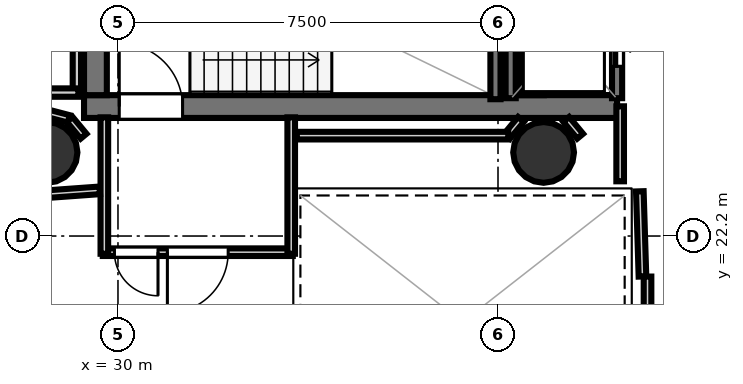
"""IFC4 building model, lengths in metres.
Left out: names, types, materials, properties, quantities, classifications, styles, units other than length and angle.
Written with IfcOpenShell. Run it as: python <this file> out.ifc"""

import sys

from ifc_helpers import new_model, si_unit, direction, frame, frame_2d, origin, origin_2d, place, context, subcontext, project, spatial, rectangle, hollow_circle, extrude, element, fill, save


model = new_model("IFC4")
c1 = context("Model", 3, precision=1e-05, world=origin(), true_north=direction((0.0, 1.0)))
c2 = subcontext(c1, "Body", "Model", "MODEL_VIEW")
j1 = project(units=[si_unit("LENGTHUNIT", "METRE"), si_unit("PLANEANGLEUNIT", "RADIAN")], contexts=[c1])
p1 = place(None, origin())
s1 = spatial("IfcSite", under=j1, at=p1, CompositionType="ELEMENT")
p2 = place(p1, origin())
s2 = spatial("IfcBuilding", under=s1, at=p2, CompositionType="ELEMENT")
p3 = place(p2, frame((0.0, 0.0, 207.7)))
s3 = spatial("IfcBuildingStorey", under=s2, at=p3, CompositionType="ELEMENT", Elevation=207.7)
p4 = place(p3, frame((29.33, 24.755, 0.0), z_axis=(0.0, 0.0, 1.0), x_axis=(1.0, 0.0, 0.0)))
e1 = element("IfcWall", 1, at=p4, inside=s3, PredefinedType="SHEAR", context=c2, shape_type="SweptSolid", body=[
    extrude(rectangle(XDim=10.52, YDim=0.45, at=frame_2d((5.26, 0.0))), origin(), (0.0, 0.0, 1.0), 3.52),
])
p5 = place(p4, frame((0.695, 0.0, 0.0)))
e2 = element("IfcOpeningElement", 2, at=p5, cuts=e1, PredefinedType="OPENING", context=c2, shape_type="SweptSolid", body=[
    extrude(rectangle(XDim=1.25, YDim=2.15, at=frame_2d((0.625, 1.075))), frame((0.0, 0.235, 0.0), z_axis=(0.0, -1.0, 0.0), x_axis=(1.0, 0.0, 0.0)), (0.0, 0.0, 1.0), 0.47),
])
for number, where, z_axis, x_axis in (
    (3, (29.555, 24.98, 0.0), (0.0, 0.0, 1.0), (0.0, 1.0, 0.0)),
    (4, (38.18, 24.98, 0.0), (0.0, 0.0, 1.0), (0.0, 1.0, 0.0)),
):
    element("IfcWall", number, at=place(p3, frame(where, z_axis=z_axis, x_axis=x_axis)), inside=s3, PredefinedType="SHEAR", context=c2, shape_type="SweptSolid", body=[
        extrude(rectangle(XDim=7.44, YDim=0.45, at=frame_2d((3.72, 0.0))), origin(), (0.0, 0.0, 1.0), 3.52),
    ])
for number, where, z_axis, x_axis in (
    (5, (28.6, 23.85, 0.0), (0.0, 0.0, 1.0), (1.0, 0.0, 0.0)),
    (6, (38.4, 23.85, 0.0), (0.0, 0.0, 1.0), (1.0, 0.0, 0.0)),
):
    element("IfcColumn", number, at=place(p3, frame(where, z_axis=z_axis, x_axis=x_axis)), inside=s3, PredefinedType="COLUMN", context=c2, shape_type="SweptSolid", body=[
        extrude(hollow_circle(Radius=0.6, WallThickness=0.03, at=origin_2d()), origin(), (0.0, 0.0, 1.0), 3.7),
    ])
p6 = place(p3, frame((37.45, 24.9, 0.0), z_axis=(0.0, 0.0, 1.0), x_axis=(0.0, 1.0, 0.0)))
e7 = element("IfcWall", 7, at=p6, inside=s3, PredefinedType="SOLIDWALL", context=c2, shape_type="SweptSolid", body=[
    extrude(rectangle(XDim=3.06, YDim=0.2, at=frame_2d((1.53, 0.0))), origin(), (0.0, 0.0, 1.0), 3.52),
])
p7 = place(p3, frame((39.85, 24.92, 0.0), z_axis=(0.0, 0.0, 1.0), x_axis=(0.0, 1.0, 0.0)))
e8 = element("IfcWall", 8, at=p7, inside=s3, PredefinedType="SOLIDWALL", context=c2, shape_type="SweptSolid", body=[
    extrude(rectangle(XDim=2.36, YDim=0.2, at=frame_2d((1.18, 0.0))), origin(), (0.0, 0.0, 1.0), 3.52),
])
p8 = place(p7, frame((0.63, 0.0, 0.0)))
e9 = element("IfcOpeningElement", 9, at=p8, cuts=e8, PredefinedType="OPENING", context=c2, shape_type="SweptSolid", body=[
    extrude(rectangle(XDim=1.1, YDim=2.15, at=frame_2d((0.55, 1.075))), frame((0.0, 0.11, 0.0), z_axis=(0.0, -1.0, 0.0), x_axis=(1.0, 0.0, 0.0)), (0.0, 0.0, 1.0), 0.22),
])
p9 = place(p3, frame((37.75, 24.92, 0.0), z_axis=(0.0, 0.0, 1.0), x_axis=(0.0, 1.0, 0.0)))
e10 = element("IfcWall", 10, at=p9, inside=s3, PredefinedType="SOLIDWALL", context=c2, shape_type="SweptSolid", body=[
    extrude(rectangle(XDim=2.36, YDim=0.2, at=frame_2d((1.18, 0.0))), origin(), (0.0, 0.0, 1.0), 3.52),
])
p10 = place(p3, frame((33.45, 21.881, 0.0), z_axis=(0.0, 0.0, 1.0), x_axis=(-1.0, 0.0, 0.0)))
e11 = element("IfcWall", 11, at=p10, inside=s3, PredefinedType="PARTITIONING", context=c2, shape_type="SweptSolid", body=[
    extrude(rectangle(XDim=3.75, YDim=0.15, at=frame_2d((1.875, 0.0))), origin(), (0.0, 0.0, 1.0), 2.84),
])
p11 = place(p10, frame((1.275, 0.0, 0.0)))
e12 = element("IfcOpeningElement", 12, at=p11, cuts=e11, PredefinedType="OPENING", context=c2, shape_type="SweptSolid", body=[
    extrude(rectangle(XDim=1.2, YDim=2.15, at=frame_2d((0.6, 1.075))), frame((0.0, 0.085, 0.0), z_axis=(0.0, -1.0, 0.0), x_axis=(1.0, 0.0, 0.0)), (0.0, 0.0, 1.0), 0.17),
])
p12 = place(p10, frame((2.66, 0.0, 0.0)))
e13 = element("IfcOpeningElement", 13, at=p12, cuts=e11, PredefinedType="OPENING", context=c2, shape_type="SweptSolid", body=[
    extrude(rectangle(XDim=0.86, YDim=2.05, at=frame_2d((0.43, 1.025))), frame((0.0, 0.085, 0.0), z_axis=(0.0, -1.0, 0.0), x_axis=(1.0, 0.0, 0.0)), (0.0, 0.0, 1.0), 0.17),
])
for number, where, z_axis, x_axis in (
    (14, (29.731, 21.85, 0.0), (0.0, 0.0, 1.0), (0.0, 1.0, 0.0)),
    (15, (33.419, 24.542, 0.0), (0.0, 0.0, 1.0), (0.0, -1.0, 0.0)),
):
    element("IfcWall", number, at=place(p3, frame(where, z_axis=z_axis, x_axis=x_axis)), inside=s3, PredefinedType="PARTITIONING", context=c2, shape_type="SweptSolid", body=[
        extrude(rectangle(XDim=2.692, YDim=0.15, at=frame_2d((1.346, 0.0))), origin(), (0.0, 0.0, 1.0), 2.84),
    ])
p13 = place(p3, frame((40.351, 21.401, 0.0), z_axis=(0.0, 0.0, 1.0), x_axis=(-0.031058045979, 0.999517582527, 0.0)))
e16 = element("IfcWall", 16, at=p13, inside=s3, PredefinedType="PARTITIONING", context=c2, shape_type="SweptSolid", body=[
    extrude(rectangle(XDim=1.682, YDim=0.15, at=frame_2d((0.841, 0.0))), origin(), (0.0, 0.0, 1.0), 2.84),
])
p14 = place(p3, frame((39.911, 23.28, 0.0), z_axis=(0.0, 0.0, 1.0), x_axis=(0.0, 1.0, 0.0)))
e17 = element("IfcWall", 17, at=p14, inside=s3, PredefinedType="PARTITIONING", context=c2, shape_type="SweptSolid", body=[
    extrude(rectangle(XDim=1.48, YDim=0.15, at=frame_2d((0.74, 0.0))), origin(), (0.0, 0.0, 1.0), 2.84),
])
p15 = place(p3, frame((40.451, 18.08, 0.0), z_axis=(0.0, 0.0, 1.0), x_axis=(0.0, 1.0, 0.0)))
e18 = element("IfcWall", 18, at=p15, inside=s3, PredefinedType="PARTITIONING", context=c2, shape_type="SweptSolid", body=[
    extrude(rectangle(XDim=3.32, YDim=0.15, at=frame_2d((1.66, 0.0))), origin(), (0.0, 0.0, 1.0), 2.84),
])
p16 = place(p3, frame((29.189, 29.12, 0.0), z_axis=(0.0, 0.0, 1.0), x_axis=(0.0, -1.0, 0.0)))
e19 = element("IfcWall", 19, at=p16, inside=s3, PredefinedType="PLUMBINGWALL", context=c2, shape_type="SweptSolid", body=[
    extrude(rectangle(XDim=4.12, YDim=0.165, at=frame_2d((2.06, 0.0))), origin(), (0.0, 0.0, 1.0), 2.84),
])
p17 = place(p3, frame((29.22, 25.031, 0.0), z_axis=(0.0, 0.0, 1.0), x_axis=(-1.0, 0.0, 0.0)))
e20 = element("IfcWall", 20, at=p17, inside=s3, PredefinedType="PLUMBINGWALL", context=c2, shape_type="SweptSolid", body=[
    extrude(rectangle(XDim=1.5, YDim=0.165, at=frame_2d((0.75, 0.0))), origin(), (0.0, 0.0, 1.0), 2.84),
])
p18 = place(p3, frame((29.321, 24.17, 0.0), z_axis=(0.0, 0.0, 1.0), x_axis=(-0.638008265708, 0.770029514296, 0.0)))
e21 = element("IfcWall", 21, at=p18, inside=s3, PredefinedType="PARTITIONING", context=c2, shape_type="SweptSolid", body=[
    extrude(rectangle(XDim=0.431, YDim=0.15, at=frame_2d((0.215, 0.0))), origin(), (0.0, 0.0, 1.0), 2.84),
])
p19 = place(p3, frame((29.03, 24.512, 0.0), z_axis=(0.0, 0.0, 1.0), x_axis=(-0.967681003213, 0.252177469296, 0.0)))
e22 = element("IfcWall", 22, at=p19, inside=s3, PredefinedType="PARTITIONING", context=c2, shape_type="SweptSolid", body=[
    extrude(rectangle(XDim=0.488, YDim=0.15, at=frame_2d((0.244, 0.0))), origin(), (0.0, 0.0, 1.0), 2.84),
])
for number, where, z_axis, x_axis in (
    (23, (39.121, 24.17, 0.0), (0.0, 0.0, 1.0), (-0.638, 0.77, 0.0)),
    (24, (37.954, 24.502, 0.0), (0.0, 0.0, 1.0), (-0.638, -0.77, 0.0)),
):
    element("IfcWall", number, at=place(p3, frame(where, z_axis=z_axis, x_axis=x_axis)), inside=s3, PredefinedType="PARTITIONING", context=c2, shape_type="SweptSolid", body=[
        extrude(rectangle(XDim=0.431, YDim=0.15, at=frame_2d((0.215, 0.0))), origin(), (0.0, 0.0, 1.0), 2.84),
    ])
p20 = place(p3, frame((37.703, 24.181, 0.0), z_axis=(0.0, 0.0, 1.0), x_axis=(-1.0, 0.0, 0.0)))
e25 = element("IfcWall", 25, at=p20, inside=s3, PredefinedType="PARTITIONING", context=c2, shape_type="SweptSolid", body=[
    extrude(rectangle(XDim=4.173, YDim=0.15, at=frame_2d((2.086, 0.0))), origin(), (0.0, 0.0, 1.0), 2.84),
])
p21 = place(p3, frame((28.442, 23.015, 0.0), z_axis=(0.0, 0.0, 1.0), x_axis=(0.99740683837, 0.07196942943, 0.0)))
e26 = element("IfcWall", 26, at=p21, inside=s3, PredefinedType="PARTITIONING", context=c2, shape_type="SweptSolid", body=[
    extrude(rectangle(XDim=1.201, YDim=0.15, at=frame_2d((0.601, 0.0))), origin(), (0.0, 0.0, 1.0), 2.84),
])
p22 = place(p5, origin())
e27 = element("IfcDoor", 27, at=p22, inside=s3, OperationType="SINGLE_SWING_LEFT", PredefinedType="DOOR", context=c2, shape_type="SweptSolid", body=[
    extrude(rectangle(XDim=1.25, YDim=2.15, at=frame_2d((0.625, 1.075))), frame((0.0, 0.025, 0.0), z_axis=(0.0, -1.0, 0.0), x_axis=(1.0, 0.0, 0.0)), (0.0, 0.0, 1.0), 0.05),
])
fill(e2, e27)
p23 = place(p8, origin())
e28 = element("IfcDoor", 28, at=p23, inside=s3, OperationType="SLIDING_TO_LEFT", PredefinedType="DOOR", context=c2, shape_type="SweptSolid", body=[
    extrude(rectangle(XDim=1.1, YDim=2.15, at=frame_2d((0.55, 1.075))), frame((0.0, 0.025, 0.0), z_axis=(0.0, -1.0, 0.0), x_axis=(1.0, 0.0, 0.0)), (0.0, 0.0, 1.0), 0.05),
])
fill(e9, e28)
p24 = place(p11, origin())
e29 = element("IfcDoor", 29, at=p24, inside=s3, OperationType="SINGLE_SWING_RIGHT", PredefinedType="DOOR", context=c2, shape_type="SweptSolid", body=[
    extrude(rectangle(XDim=1.2, YDim=2.15, at=frame_2d((0.6, 1.075))), frame((0.0, 0.025, 0.0), z_axis=(0.0, -1.0, 0.0), x_axis=(1.0, 0.0, 0.0)), (0.0, 0.0, 1.0), 0.05),
])
fill(e12, e29)
p25 = place(p12, origin())
e30 = element("IfcDoor", 30, at=p25, inside=s3, OperationType="SINGLE_SWING_LEFT", PredefinedType="DOOR", context=c2, shape_type="SweptSolid", body=[
    extrude(rectangle(XDim=0.86, YDim=2.05, at=frame_2d((0.43, 1.025))), frame((0.0, 0.025, 0.0), z_axis=(0.0, -1.0, 0.0), x_axis=(1.0, 0.0, 0.0)), (0.0, 0.0, 1.0), 0.05),
])
fill(e13, e30)
save(model, sys.argv[1])
